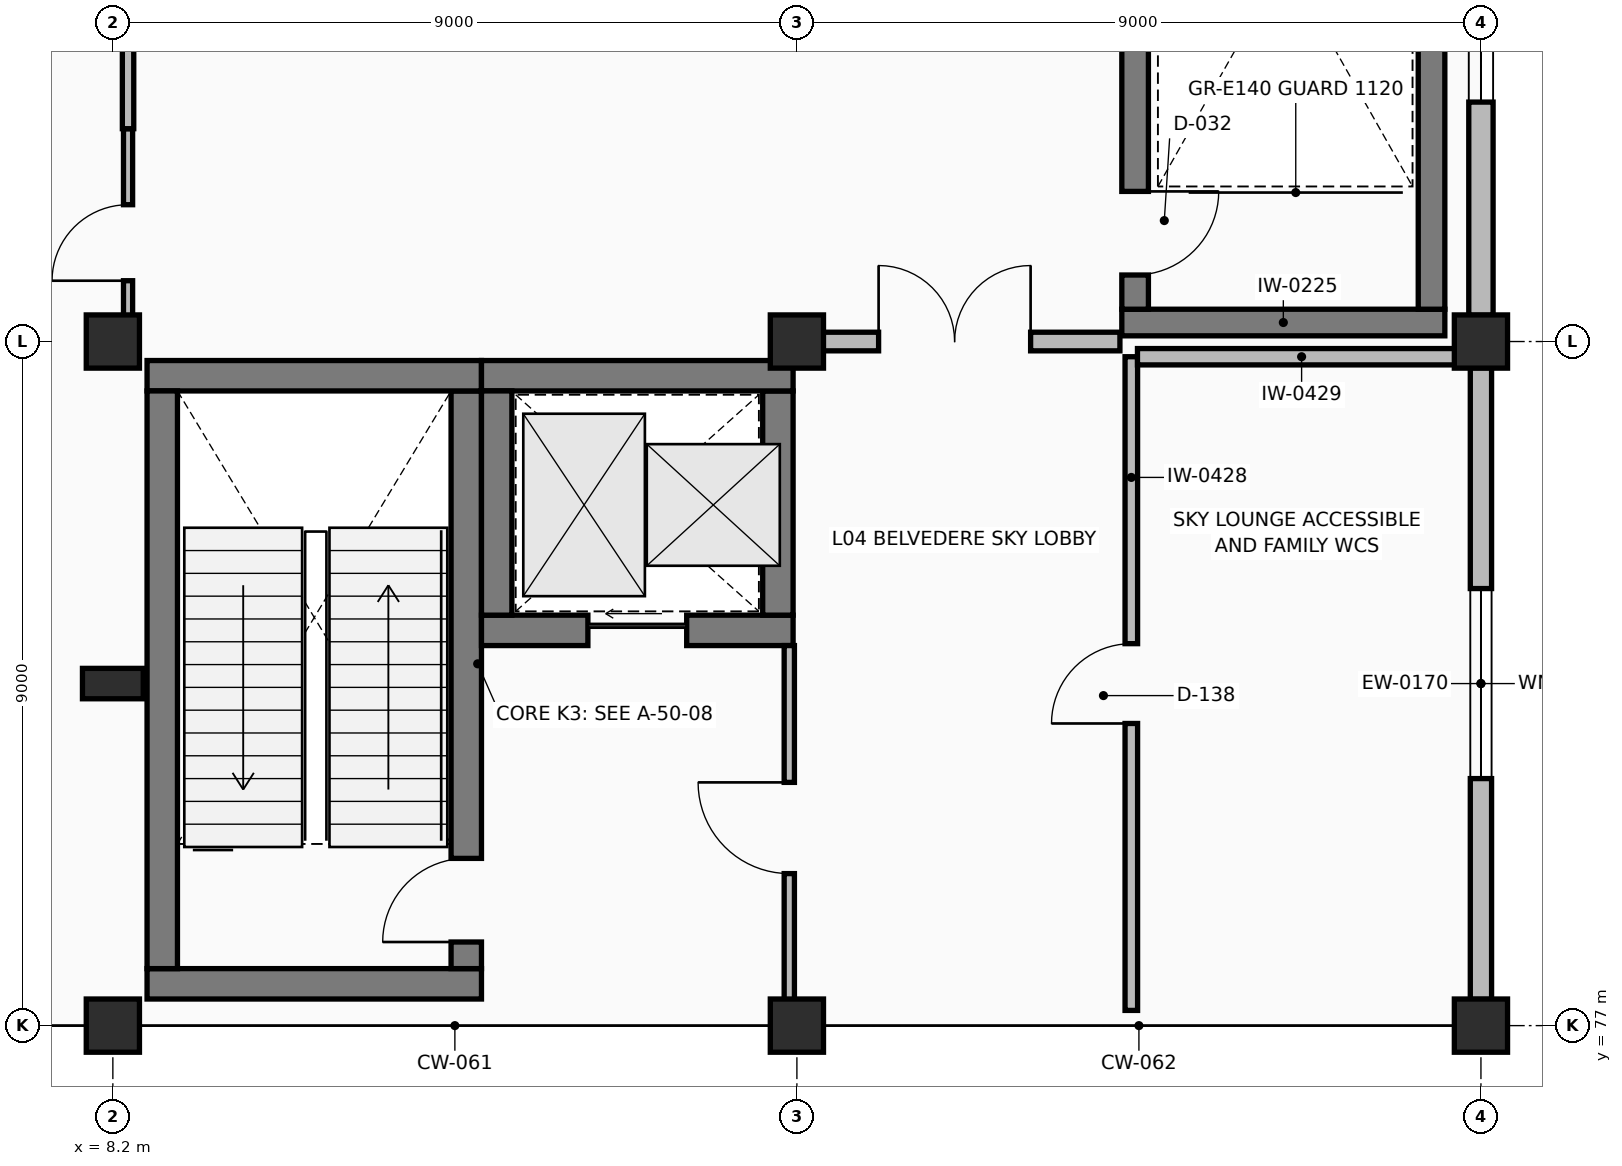
"""IFC4 building model, lengths in metres.
Left out: names, types, materials, properties, quantities, classifications, styles, units other than length and angle.
Written with IfcOpenShell. Run it as: python <this file> out.ifc"""

import sys

from ifc_helpers import new_model, si_unit, direction, frame, frame_2d, origin, origin_2d, place, context, subcontext, project, spatial, rectangle, extrude, element, fill, save


model = new_model("IFC4")
c1 = context("Model", 3, precision=1e-05, world=origin(), true_north=direction((0.0, 1.0)))
c2 = subcontext(c1, "Body", "Model", "MODEL_VIEW")
j1 = project(units=[si_unit("LENGTHUNIT", "METRE"), si_unit("PLANEANGLEUNIT", "RADIAN")], contexts=[c1])
p1 = place(None, origin())
s1 = spatial("IfcSite", under=j1, at=p1, CompositionType="ELEMENT")
p2 = place(p1, origin())
s2 = spatial("IfcBuilding", under=s1, at=p2, CompositionType="ELEMENT")
p3 = place(p2, frame((0.0, 0.0, 18.9)))
s3 = spatial("IfcBuildingStorey", under=s2, at=p3, CompositionType="ELEMENT", Elevation=18.9)
for number, where, z_axis, x_axis in (
    (1, (8.2, 77.0, 0.0), (0.0, 0.0, 1.0), (1.0, 0.0, 0.0)),
    (2, (8.2, 86.0, 0.0), (0.0, 0.0, 1.0), (1.0, 0.0, 0.0)),
    (3, (17.2, 77.0, 0.0), (0.0, 0.0, 1.0), (1.0, 0.0, 0.0)),
    (4, (17.2, 86.0, 0.0), (0.0, 0.0, 1.0), (1.0, 0.0, 0.0)),
    (5, (26.2, 77.0, 0.0), (0.0, 0.0, 1.0), (1.0, 0.0, 0.0)),
    (6, (26.2, 86.0, 0.0), (0.0, 0.0, 1.0), (1.0, 0.0, 0.0)),
):
    element("IfcColumn", number, at=place(p3, frame(where, z_axis=z_axis, x_axis=x_axis)), inside=s3, PredefinedType="COLUMN", context=c2, shape_type="SweptSolid", body=[
        extrude(rectangle(XDim=0.7, YDim=0.7, at=origin_2d()), origin(), (0.0, 0.0, 1.0), 4.5),
    ])
p4 = place(p3, frame((8.2, 81.5, 0.0), z_axis=(0.0, 0.0, 1.0), x_axis=(0.0, 1.0, 0.0)))
e7 = element("IfcColumn", 7, at=p4, inside=s3, PredefinedType="PILASTER", context=c2, shape_type="SweptSolid", body=[
    extrude(rectangle(XDim=0.4, YDim=0.8, at=origin_2d()), origin(), (0.0, 0.0, 1.0), 4.5),
])
p5 = place(p3, frame((26.2, 77.345, 0.0), z_axis=(0.0, 0.0, 1.0), x_axis=(0.0, 1.0, 0.0)))
e8 = element("IfcWall", 8, at=p5, inside=s3, PredefinedType="SOLIDWALL", context=c2, shape_type="SweptSolid", body=[
    extrude(rectangle(XDim=8.31, YDim=0.28, at=frame_2d((4.155, 0.0))), origin(), (0.0, 0.0, 1.0), 4.19),
])
p6 = place(p5, frame((2.905, 0.0, 0.9)))
e9 = element("IfcOpeningElement", 9, at=p6, cuts=e8, PredefinedType="OPENING", context=c2, shape_type="SweptSolid", body=[
    extrude(rectangle(XDim=2.5, YDim=1.45, at=frame_2d((1.25, 0.725))), frame((0.0, 0.15, 0.0), z_axis=(0.0, -1.0, 0.0), x_axis=(1.0, 0.0, 0.0)), (0.0, 0.0, 1.0), 0.3),
])
p7 = place(p3, frame((26.2, 86.345, 0.0), z_axis=(0.0, 0.0, 1.0), x_axis=(0.0, 1.0, 0.0)))
e10 = element("IfcWall", 10, at=p7, inside=s3, PredefinedType="SOLIDWALL", context=c2, shape_type="SweptSolid", body=[
    extrude(rectangle(XDim=8.31, YDim=0.32, at=frame_2d((4.155, 0.0))), origin(), (0.0, 0.0, 1.0), 4.19),
])
p8 = place(p7, frame((2.805, 0.0, 0.9)))
e11 = element("IfcOpeningElement", 11, at=p8, cuts=e10, PredefinedType="OPENING", context=c2, shape_type="SweptSolid", body=[
    extrude(rectangle(XDim=2.7, YDim=1.5, at=frame_2d((1.35, 0.75))), frame((0.0, 0.17, 0.0), z_axis=(0.0, -1.0, 0.0), x_axis=(1.0, 0.0, 0.0)), (0.0, 0.0, 1.0), 0.34),
])
p9 = place(p3, frame((8.65, 77.55, 0.0), z_axis=(0.0, 0.0, 1.0), x_axis=(1.0, 0.0, 0.0)))
e12 = element("IfcWall", 12, at=p9, inside=s3, PredefinedType="SHEAR", context=c2, shape_type="SweptSolid", body=[
    extrude(rectangle(XDim=4.4, YDim=0.4, at=frame_2d((2.2, 0.0))), origin(), (0.0, 0.0, 1.0), 4.28),
])
p10 = place(p3, frame((12.85, 77.75, 0.0), z_axis=(0.0, 0.0, 1.0), x_axis=(0.0, 1.0, 0.0)))
e13 = element("IfcWall", 13, at=p10, inside=s3, PredefinedType="SHEAR", context=c2, shape_type="SweptSolid", body=[
    extrude(rectangle(XDim=7.6, YDim=0.4, at=frame_2d((3.8, 0.0))), origin(), (0.0, 0.0, 1.0), 4.28),
])
p11 = place(p10, frame((0.35, 0.0, 0.0)))
e14 = element("IfcOpeningElement", 14, at=p11, cuts=e13, PredefinedType="OPENING", context=c2, shape_type="SweptSolid", body=[
    extrude(rectangle(XDim=1.1, YDim=2.2, at=frame_2d((0.55, 1.1))), frame((0.0, 0.21, 0.0), z_axis=(0.0, -1.0, 0.0), x_axis=(1.0, 0.0, 0.0)), (0.0, 0.0, 1.0), 0.42),
])
p12 = place(p3, frame((13.05, 85.55, 0.0), z_axis=(0.0, 0.0, 1.0), x_axis=(-1.0, 0.0, 0.0)))
e15 = element("IfcWall", 15, at=p12, inside=s3, PredefinedType="SHEAR", context=c2, shape_type="SweptSolid", body=[
    extrude(rectangle(XDim=4.4, YDim=0.4, at=frame_2d((2.2, 0.0))), origin(), (0.0, 0.0, 1.0), 4.28),
])
p13 = place(p3, frame((8.85, 85.35, 0.0), z_axis=(0.0, 0.0, 1.0), x_axis=(0.0, -1.0, 0.0)))
e16 = element("IfcWall", 16, at=p13, inside=s3, PredefinedType="SHEAR", context=c2, shape_type="SweptSolid", body=[
    extrude(rectangle(XDim=7.6, YDim=0.4, at=frame_2d((3.8, 0.0))), origin(), (0.0, 0.0, 1.0), 4.28),
])
p14 = place(p3, frame((13.05, 82.2, 0.0), z_axis=(0.0, 0.0, 1.0), x_axis=(1.0, 0.0, 0.0)))
e17 = element("IfcWall", 17, at=p14, inside=s3, PredefinedType="SHEAR", context=c2, shape_type="SweptSolid", body=[
    extrude(rectangle(XDim=4.1, YDim=0.4, at=frame_2d((2.05, 0.0))), origin(), (0.0, 0.0, 1.0), 4.28),
])
p15 = place(p14, frame((1.4, 0.0, 0.0)))
e18 = element("IfcOpeningElement", 18, at=p15, cuts=e17, PredefinedType="OPENING", context=c2, shape_type="SweptSolid", body=[
    extrude(rectangle(XDim=1.3, YDim=2.25, at=frame_2d((0.65, 1.125))), frame((0.0, 0.21, 0.0), z_axis=(0.0, -1.0, 0.0), x_axis=(1.0, 0.0, 0.0)), (0.0, 0.0, 1.0), 0.42),
])
p16 = place(p3, frame((16.95, 82.4, 0.0), z_axis=(0.0, 0.0, 1.0), x_axis=(0.0, 1.0, 0.0)))
e19 = element("IfcWall", 19, at=p16, inside=s3, PredefinedType="SHEAR", context=c2, shape_type="SweptSolid", body=[
    extrude(rectangle(XDim=2.95, YDim=0.4, at=frame_2d((1.475, 0.0))), origin(), (0.0, 0.0, 1.0), 4.28),
])
p17 = place(p3, frame((17.15, 85.55, 0.0), z_axis=(0.0, 0.0, 1.0), x_axis=(-1.0, 0.0, 0.0)))
e20 = element("IfcWall", 20, at=p17, inside=s3, PredefinedType="SHEAR", context=c2, shape_type="SweptSolid", body=[
    extrude(rectangle(XDim=4.1, YDim=0.4, at=frame_2d((2.05, 0.0))), origin(), (0.0, 0.0, 1.0), 4.28),
])
p18 = place(p3, frame((13.25, 85.35, 0.0), z_axis=(0.0, 0.0, 1.0), x_axis=(0.0, -1.0, 0.0)))
e21 = element("IfcWall", 21, at=p18, inside=s3, PredefinedType="SHEAR", context=c2, shape_type="SweptSolid", body=[
    extrude(rectangle(XDim=2.95, YDim=0.4, at=frame_2d((1.475, 0.0))), origin(), (0.0, 0.0, 1.0), 4.28),
])
p19 = place(p3, frame((21.475, 86.25, 0.0), z_axis=(0.0, 0.0, 1.0), x_axis=(1.0, 0.0, 0.0)))
e22 = element("IfcWall", 22, at=p19, inside=s3, PredefinedType="SHEAR", context=c2, shape_type="SweptSolid", body=[
    extrude(rectangle(XDim=4.25, YDim=0.35, at=frame_2d((2.125, 0.0))), origin(), (0.0, 0.0, 1.0), 4.28),
])
p20 = place(p3, frame((25.55, 86.425, 0.0), z_axis=(0.0, 0.0, 1.0), x_axis=(0.0, 1.0, 0.0)))
e23 = element("IfcWall", 23, at=p20, inside=s3, PredefinedType="SHEAR", context=c2, shape_type="SweptSolid", body=[
    extrude(rectangle(XDim=7.55, YDim=0.35, at=frame_2d((3.775, 0.0))), origin(), (0.0, 0.0, 1.0), 4.28),
])
p21 = place(p3, frame((21.65, 93.975, 0.0), z_axis=(0.0, 0.0, 1.0), x_axis=(0.0, -1.0, 0.0)))
e24 = element("IfcWall", 24, at=p21, inside=s3, PredefinedType="SHEAR", context=c2, shape_type="SweptSolid", body=[
    extrude(rectangle(XDim=7.55, YDim=0.35, at=frame_2d((3.775, 0.0))), origin(), (0.0, 0.0, 1.0), 4.28),
])
p22 = place(p21, frame((6.0, 0.0, 0.0)))
e25 = element("IfcOpeningElement", 25, at=p22, cuts=e24, PredefinedType="OPENING", context=c2, shape_type="SweptSolid", body=[
    extrude(rectangle(XDim=1.1, YDim=2.2, at=frame_2d((0.55, 1.1))), frame((0.0, 0.185, 0.0), z_axis=(0.0, -1.0, 0.0), x_axis=(1.0, 0.0, 0.0)), (0.0, 0.0, 1.0), 0.37),
])
p23 = place(p3, frame((17.1, 77.2, 0.0), z_axis=(0.0, 0.0, 1.0), x_axis=(0.0, 1.0, 0.0)))
e26 = element("IfcWall", 26, at=p23, inside=s3, PredefinedType="PARTITIONING", context=c2, shape_type="SweptSolid", body=[
    extrude(rectangle(XDim=4.8, YDim=0.135, at=frame_2d((2.4, 0.0))), origin(), (0.0, 0.0, 1.0), 4.135),
])
p24 = place(p23, frame((1.8, 0.0, 0.0)))
e27 = element("IfcOpeningElement", 27, at=p24, cuts=e26, PredefinedType="OPENING", context=c2, shape_type="SweptSolid", body=[
    extrude(rectangle(XDim=1.2, YDim=2.2, at=frame_2d((0.6, 1.1))), frame((0.0, 0.077, 0.0), z_axis=(0.0, -1.0, 0.0), x_axis=(1.0, 0.0, 0.0)), (0.0, 0.0, 1.0), 0.155),
])
p25 = place(p3, frame((21.6, 77.2, 0.0), z_axis=(0.0, 0.0, 1.0), x_axis=(0.0, 1.0, 0.0)))
e28 = element("IfcWall", 28, at=p25, inside=s3, PredefinedType="PARTITIONING", context=c2, shape_type="SweptSolid", body=[
    extrude(rectangle(XDim=8.6, YDim=0.165, at=frame_2d((4.3, 0.0))), origin(), (0.0, 0.0, 1.0), 4.135),
])
p26 = place(p25, frame((3.775, 0.0, 0.0)))
e29 = element("IfcOpeningElement", 29, at=p26, cuts=e28, PredefinedType="OPENING", context=c2, shape_type="SweptSolid", body=[
    extrude(rectangle(XDim=1.05, YDim=2.15, at=frame_2d((0.525, 1.075))), frame((0.0, 0.093, 0.0), z_axis=(0.0, -1.0, 0.0), x_axis=(1.0, 0.0, 0.0)), (0.0, 0.0, 1.0), 0.185),
])
p27 = place(p3, frame((21.681, 85.8, 0.0), z_axis=(0.0, 0.0, 1.0), x_axis=(1.0, 0.0, 0.0)))
e30 = element("IfcWall", 30, at=p27, inside=s3, PredefinedType="PARTITIONING", context=c2, shape_type="SweptSolid", body=[
    extrude(rectangle(XDim=4.319, YDim=0.215, at=frame_2d((2.16, 0.0))), origin(), (0.0, 0.0, 1.0), 4.135),
])
p28 = place(p3, frame((17.1, 86.0, 0.0), z_axis=(0.0, 0.0, 1.0), x_axis=(1.0, 0.0, 0.0)))
e31 = element("IfcWall", 31, at=p28, inside=s3, PredefinedType="PARTITIONING", context=c2, shape_type="SweptSolid", body=[
    extrude(rectangle(XDim=4.35, YDim=0.245, at=frame_2d((2.175, 0.0))), origin(), (0.0, 0.0, 1.0), 4.135),
])
p29 = place(p28, frame((1.175, 0.0, 0.0)))
e32 = element("IfcOpeningElement", 32, at=p29, cuts=e31, PredefinedType="OPENING", context=c2, shape_type="SweptSolid", body=[
    extrude(rectangle(XDim=2.0, YDim=2.4, at=frame_2d((1.0, 1.2))), frame((0.0, 0.133, 0.0), z_axis=(0.0, -1.0, 0.0), x_axis=(1.0, 0.0, 0.0)), (0.0, 0.0, 1.0), 0.265),
])
p30 = place(p3, frame((8.4, 85.8, 0.0), z_axis=(0.0, 0.0, 1.0), x_axis=(0.0, 1.0, 0.0)))
e33 = element("IfcWall", 33, at=p30, inside=s3, PredefinedType="PARTITIONING", context=c2, shape_type="SweptSolid", body=[
    extrude(rectangle(XDim=3.0, YDim=0.12, at=frame_2d((1.5, 0.0))), origin(), (0.0, 0.0, 1.0), 4.135),
])
p31 = place(p30, frame((1.0, 0.0, 0.0)))
e34 = element("IfcOpeningElement", 34, at=p31, cuts=e33, PredefinedType="OPENING", context=c2, shape_type="SweptSolid", body=[
    extrude(rectangle(XDim=1.0, YDim=2.15, at=frame_2d((0.5, 1.075))), frame((0.0, 0.07, 0.0), z_axis=(0.0, -1.0, 0.0), x_axis=(1.0, 0.0, 0.0)), (0.0, 0.0, 1.0), 0.14),
])
p32 = place(p3, frame((8.4, 88.8, 0.0), z_axis=(0.0, 0.0, 1.0), x_axis=(0.0, 1.0, 0.0)))
e35 = element("IfcWall", 35, at=p32, inside=s3, PredefinedType="PARTITIONING", context=c2, shape_type="SweptSolid", body=[
    extrude(rectangle(XDim=15.0, YDim=0.15, at=frame_2d((7.5, 0.0))), origin(), (0.0, 0.0, 1.0), 4.135),
])
p33 = place(p6, origin())
e36 = element("IfcWindow", 36, at=p33, inside=s3, PartitioningType="SINGLE_PANEL", PredefinedType="WINDOW", context=c2, shape_type="SweptSolid", body=[
    extrude(rectangle(XDim=2.5, YDim=1.45, at=frame_2d((1.25, 0.725))), frame((0.0, 0.03, 0.0), z_axis=(0.0, -1.0, 0.0), x_axis=(1.0, 0.0, 0.0)), (0.0, 0.0, 1.0), 0.06),
])
fill(e9, e36)
p34 = place(p8, origin())
e37 = element("IfcWindow", 37, at=p34, inside=s3, PartitioningType="SINGLE_PANEL", PredefinedType="WINDOW", context=c2, shape_type="SweptSolid", body=[
    extrude(rectangle(XDim=2.7, YDim=1.5, at=frame_2d((1.35, 0.75))), frame((0.0, 0.03, 0.0), z_axis=(0.0, -1.0, 0.0), x_axis=(1.0, 0.0, 0.0)), (0.0, 0.0, 1.0), 0.06),
])
fill(e11, e37)
p35 = place(p11, origin())
e38 = element("IfcDoor", 38, at=p35, inside=s3, OperationType="SINGLE_SWING_LEFT", PredefinedType="DOOR", context=c2, shape_type="SweptSolid", body=[
    extrude(rectangle(XDim=1.1, YDim=2.2, at=frame_2d((0.55, 1.1))), frame((0.0, 0.025, 0.0), z_axis=(0.0, -1.0, 0.0), x_axis=(1.0, 0.0, 0.0)), (0.0, 0.0, 1.0), 0.05),
])
fill(e14, e38)
p36 = place(p15, origin())
e39 = element("IfcDoor", 39, at=p36, inside=s3, OperationType="SLIDING_TO_LEFT", PredefinedType="DOOR", context=c2, shape_type="SweptSolid", body=[
    extrude(rectangle(XDim=1.3, YDim=2.25, at=frame_2d((0.65, 1.125))), frame((0.0, 0.025, 0.0), z_axis=(0.0, -1.0, 0.0), x_axis=(1.0, 0.0, 0.0)), (0.0, 0.0, 1.0), 0.05),
])
fill(e18, e39)
p37 = place(p22, origin())
e40 = element("IfcDoor", 40, at=p37, inside=s3, OperationType="SINGLE_SWING_LEFT", PredefinedType="DOOR", context=c2, shape_type="SweptSolid", body=[
    extrude(rectangle(XDim=1.1, YDim=2.2, at=frame_2d((0.55, 1.1))), frame((0.0, 0.025, 0.0), z_axis=(0.0, -1.0, 0.0), x_axis=(1.0, 0.0, 0.0)), (0.0, 0.0, 1.0), 0.05),
])
fill(e25, e40)
p38 = place(p24, origin())
e41 = element("IfcDoor", 41, at=p38, inside=s3, OperationType="SINGLE_SWING_RIGHT", PredefinedType="DOOR", context=c2, shape_type="SweptSolid", body=[
    extrude(rectangle(XDim=1.2, YDim=2.2, at=frame_2d((0.6, 1.1))), frame((0.0, 0.025, 0.0), z_axis=(0.0, -1.0, 0.0), x_axis=(1.0, 0.0, 0.0)), (0.0, 0.0, 1.0), 0.05),
])
fill(e27, e41)
p39 = place(p26, origin())
e42 = element("IfcDoor", 42, at=p39, inside=s3, OperationType="SINGLE_SWING_LEFT", PredefinedType="DOOR", context=c2, shape_type="SweptSolid", body=[
    extrude(rectangle(XDim=1.05, YDim=2.15, at=frame_2d((0.525, 1.075))), frame((0.0, 0.025, 0.0), z_axis=(0.0, -1.0, 0.0), x_axis=(1.0, 0.0, 0.0)), (0.0, 0.0, 1.0), 0.05),
])
fill(e29, e42)
p40 = place(p29, origin())
e43 = element("IfcDoor", 43, at=p40, inside=s3, OperationType="DOUBLE_DOOR_SINGLE_SWING", PredefinedType="DOOR", context=c2, shape_type="SweptSolid", body=[
    extrude(rectangle(XDim=2.0, YDim=2.4, at=frame_2d((1.0, 1.2))), frame((0.0, 0.025, 0.0), z_axis=(0.0, -1.0, 0.0), x_axis=(1.0, 0.0, 0.0)), (0.0, 0.0, 1.0), 0.05),
])
fill(e32, e43)
p41 = place(p31, origin())
e44 = element("IfcDoor", 44, at=p41, inside=s3, OperationType="SINGLE_SWING_LEFT", PredefinedType="DOOR", context=c2, shape_type="SweptSolid", body=[
    extrude(rectangle(XDim=1.0, YDim=2.15, at=frame_2d((0.5, 1.075))), frame((0.0, 0.025, 0.0), z_axis=(0.0, -1.0, 0.0), x_axis=(1.0, 0.0, 0.0)), (0.0, 0.0, 1.0), 0.05),
])
fill(e34, e44)
save(model, sys.argv[1])
